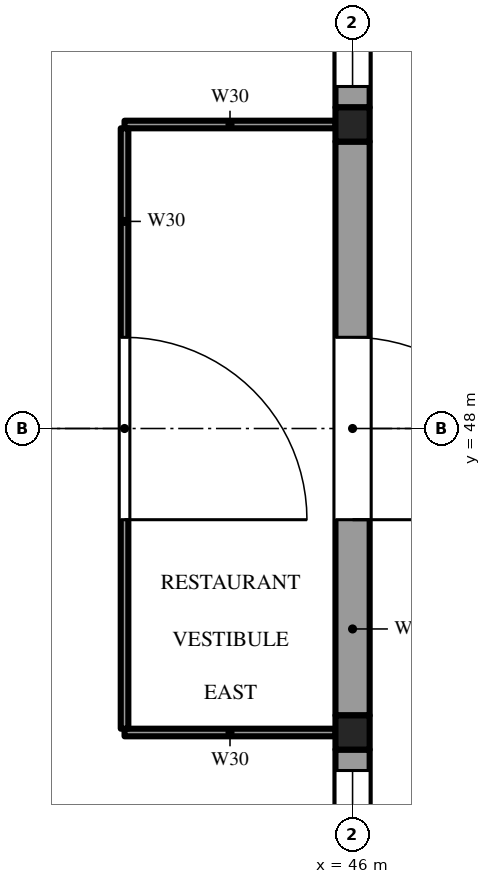
"""IFC4 building model, lengths in metres.
Left out: names, types, materials, properties, quantities, classifications, styles, units other than length and angle.
Written with IfcOpenShell. Run it as: python <this file> out.ifc"""

import sys

from ifc_helpers import new_model, si_unit, direction, frame, frame_2d, origin, origin_2d, place, context, subcontext, project, spatial, rectangle, extrude, element, fill, save


model = new_model("IFC4")
c1 = context("Model", 3, precision=1e-05, world=origin(), true_north=direction((0.0, 1.0)))
c2 = subcontext(c1, "Body", "Model", "MODEL_VIEW")
j1 = project(units=[si_unit("LENGTHUNIT", "METRE"), si_unit("PLANEANGLEUNIT", "RADIAN")], contexts=[c1])
p1 = place(None, origin())
s1 = spatial("IfcSite", under=j1, at=p1, CompositionType="ELEMENT")
p2 = place(p1, origin())
s2 = spatial("IfcBuilding", under=s1, at=p2, CompositionType="ELEMENT")
p3 = place(p2, origin())
s3 = spatial("IfcBuildingStorey", under=s2, at=p3, CompositionType="ELEMENT", Elevation=0.0)
for number, where, z_axis, x_axis in (
    (1, (46.0, 44.0, -0.4), (0.0, 0.0, 1.0), (1.0, 0.0, 0.0)),
    (2, (46.0, 52.0, -0.4), (0.0, 0.0, 1.0), (1.0, 0.0, 0.0)),
):
    element("IfcColumn", number, at=place(p3, frame(where, z_axis=z_axis, x_axis=x_axis)), inside=s3, PredefinedType="COLUMN", context=c2, shape_type="SweptSolid", body=[
        extrude(rectangle(XDim=0.45, YDim=0.45, at=origin_2d()), origin(), (0.0, 0.0, 1.0), 7.6),
    ])
for number, where, z_axis, x_axis in (
    (3, (43.0, 44.0, 0.0), (0.0, 0.0, 1.0), (1.0, 0.0, 0.0)),
    (4, (43.0, 52.0, 0.0), (0.0, 0.0, 1.0), (1.0, 0.0, 0.0)),
):
    element("IfcWall", number, at=place(p3, frame(where, z_axis=z_axis, x_axis=x_axis)), inside=s3, PredefinedType="PARTITIONING", context=c2, shape_type="SweptSolid", body=[
        extrude(rectangle(XDim=2.775, YDim=0.1, at=frame_2d((1.387, 0.0))), origin(), (0.0, 0.0, 1.0), 6.85),
    ])
p4 = place(p3, frame((43.0, 44.05, 0.0), z_axis=(0.0, 0.0, 1.0), x_axis=(0.0, 1.0, 0.0)))
e5 = element("IfcWall", 5, at=p4, inside=s3, PredefinedType="PARTITIONING", context=c2, shape_type="SweptSolid", body=[
    extrude(rectangle(XDim=7.9, YDim=0.1, at=frame_2d((3.95, 0.0))), origin(), (0.0, 0.0, 1.0), 6.85),
])
p5 = place(p4, frame((2.75, 0.0, 0.0)))
e6 = element("IfcOpeningElement", 6, at=p5, cuts=e5, PredefinedType="OPENING", context=c2, shape_type="SweptSolid", body=[
    extrude(rectangle(XDim=2.4, YDim=2.4, at=frame_2d((1.2, 1.2))), frame((0.0, 0.06, 0.0), z_axis=(0.0, -1.0, 0.0), x_axis=(1.0, 0.0, 0.0)), (0.0, 0.0, 1.0), 0.12),
])
p6 = place(p3, frame((46.0, 36.225, 0.0), z_axis=(0.0, 0.0, 1.0), x_axis=(0.0, 1.0, 0.0)))
e7 = element("IfcWall", 7, at=p6, inside=s3, PredefinedType="SOLIDWALL", context=c2, shape_type="SweptSolid", body=[
    extrude(rectangle(XDim=7.55, YDim=0.45, at=frame_2d((3.775, 0.0))), origin(), (0.0, 0.0, 1.0), 6.85),
])
p7 = place(p6, frame((0.275, 0.0, 1.0)))
e8 = element("IfcOpeningElement", 8, at=p7, cuts=e7, PredefinedType="OPENING", context=c2, shape_type="SweptSolid", body=[
    extrude(rectangle(XDim=3.0, YDim=4.0, at=frame_2d((1.5, 2.0))), frame((0.0, 0.235, 0.0), z_axis=(0.0, -1.0, 0.0), x_axis=(1.0, 0.0, 0.0)), (0.0, 0.0, 1.0), 0.47),
])
p8 = place(p6, frame((4.275, 0.0, 1.0)))
e9 = element("IfcOpeningElement", 9, at=p8, cuts=e7, PredefinedType="OPENING", context=c2, shape_type="SweptSolid", body=[
    extrude(rectangle(XDim=3.0, YDim=4.0, at=frame_2d((1.5, 2.0))), frame((0.0, 0.235, 0.0), z_axis=(0.0, -1.0, 0.0), x_axis=(1.0, 0.0, 0.0)), (0.0, 0.0, 1.0), 0.47),
])
p9 = place(p3, frame((46.0, 44.225, 0.0), z_axis=(0.0, 0.0, 1.0), x_axis=(0.0, 1.0, 0.0)))
e10 = element("IfcWall", 10, at=p9, inside=s3, PredefinedType="SOLIDWALL", context=c2, shape_type="SweptSolid", body=[
    extrude(rectangle(XDim=7.55, YDim=0.45, at=frame_2d((3.775, 0.0))), origin(), (0.0, 0.0, 1.0), 6.85),
])
p10 = place(p9, frame((2.575, 0.0, 0.0)))
e11 = element("IfcOpeningElement", 11, at=p10, cuts=e10, PredefinedType="OPENING", context=c2, shape_type="SweptSolid", body=[
    extrude(rectangle(XDim=2.4, YDim=2.4, at=frame_2d((1.2, 1.2))), frame((0.0, 0.235, 0.0), z_axis=(0.0, -1.0, 0.0), x_axis=(1.0, 0.0, 0.0)), (0.0, 0.0, 1.0), 0.47),
])
p11 = place(p3, frame((46.0, 52.225, 0.0), z_axis=(0.0, 0.0, 1.0), x_axis=(0.0, 1.0, 0.0)))
e12 = element("IfcWall", 12, at=p11, inside=s3, PredefinedType="SOLIDWALL", context=c2, shape_type="SweptSolid", body=[
    extrude(rectangle(XDim=7.55, YDim=0.45, at=frame_2d((3.775, 0.0))), origin(), (0.0, 0.0, 1.0), 6.85),
])
p12 = place(p11, frame((0.275, 0.0, 1.0)))
e13 = element("IfcOpeningElement", 13, at=p12, cuts=e12, PredefinedType="OPENING", context=c2, shape_type="SweptSolid", body=[
    extrude(rectangle(XDim=3.0, YDim=4.0, at=frame_2d((1.5, 2.0))), frame((0.0, 0.235, 0.0), z_axis=(0.0, -1.0, 0.0), x_axis=(1.0, 0.0, 0.0)), (0.0, 0.0, 1.0), 0.47),
])
p13 = place(p11, frame((4.275, 0.0, 1.0)))
e14 = element("IfcOpeningElement", 14, at=p13, cuts=e12, PredefinedType="OPENING", context=c2, shape_type="SweptSolid", body=[
    extrude(rectangle(XDim=3.0, YDim=4.0, at=frame_2d((1.5, 2.0))), frame((0.0, 0.235, 0.0), z_axis=(0.0, -1.0, 0.0), x_axis=(1.0, 0.0, 0.0)), (0.0, 0.0, 1.0), 0.47),
])
p14 = place(p5, frame((2.4, 0.0, 0.0), z_axis=(0.0, 0.0, 1.0), x_axis=(-1.0, 0.0, 0.0)))
e15 = element("IfcDoor", 15, at=p14, inside=s3, OperationType="DOUBLE_DOOR_SINGLE_SWING", PredefinedType="DOOR", context=c2, shape_type="SweptSolid", body=[
    extrude(rectangle(XDim=2.4, YDim=2.4, at=frame_2d((1.2, 1.2))), frame((0.0, 0.025, 0.0), z_axis=(0.0, -1.0, 0.0), x_axis=(1.0, 0.0, 0.0)), (0.0, 0.0, 1.0), 0.05),
])
fill(e6, e15)
p15 = place(p10, frame((2.4, 0.0, 0.0), z_axis=(0.0, 0.0, 1.0), x_axis=(-1.0, 0.0, 0.0)))
e16 = element("IfcDoor", 16, at=p15, inside=s3, OperationType="DOUBLE_DOOR_SINGLE_SWING", PredefinedType="DOOR", context=c2, shape_type="SweptSolid", body=[
    extrude(rectangle(XDim=2.4, YDim=2.4, at=frame_2d((1.2, 1.2))), frame((0.0, 0.025, 0.0), z_axis=(0.0, -1.0, 0.0), x_axis=(1.0, 0.0, 0.0)), (0.0, 0.0, 1.0), 0.05),
])
fill(e11, e16)
p16 = place(p8, origin())
e17 = element("IfcWindow", 17, at=p16, inside=s3, PartitioningType="SINGLE_PANEL", PredefinedType="WINDOW", context=c2, shape_type="SweptSolid", body=[
    extrude(rectangle(XDim=3.0, YDim=4.0, at=frame_2d((1.5, 2.0))), frame((0.0, 0.215, 0.0), z_axis=(0.0, -1.0, 0.0), x_axis=(1.0, 0.0, 0.0)), (0.0, 0.0, 1.0), 0.06),
])
fill(e9, e17)
p17 = place(p12, origin())
e18 = element("IfcWindow", 18, at=p17, inside=s3, PartitioningType="SINGLE_PANEL", PredefinedType="WINDOW", context=c2, shape_type="SweptSolid", body=[
    extrude(rectangle(XDim=3.0, YDim=4.0, at=frame_2d((1.5, 2.0))), frame((0.0, 0.215, 0.0), z_axis=(0.0, -1.0, 0.0), x_axis=(1.0, 0.0, 0.0)), (0.0, 0.0, 1.0), 0.06),
])
fill(e13, e18)
save(model, sys.argv[1])
